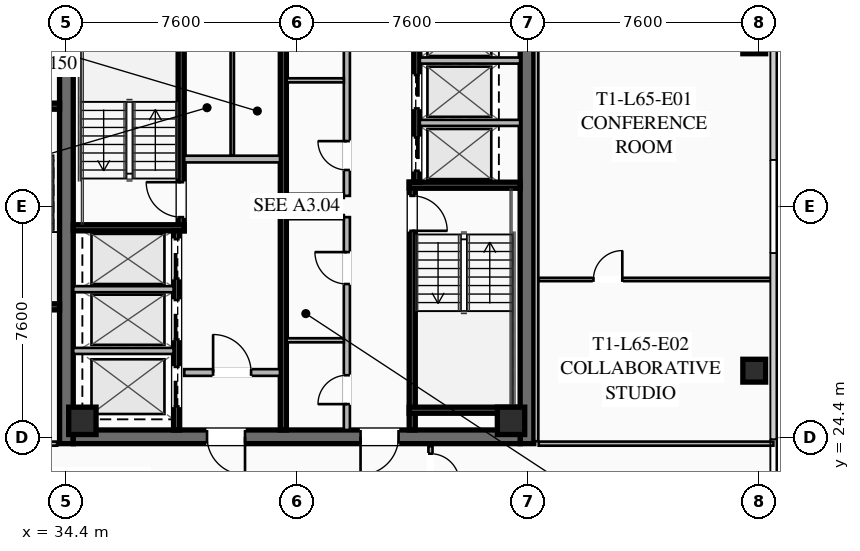
"""IFC4 building model, lengths in metres.
Left out: names, types, materials, properties, quantities, classifications, styles, units other than length and angle.
Written with IfcOpenShell. Run it as: python <this file> out.ifc"""

import sys

from ifc_helpers import new_model, si_unit, direction, frame, frame_2d, origin, origin_2d, place, context, subcontext, project, spatial, rectangle, hollow_rectangle, extrude, element, fill, save


model = new_model("IFC4")
c1 = context("Model", 3, precision=1e-05, world=origin(), true_north=direction((0.0, 1.0)))
c2 = subcontext(c1, "Body", "Model", "MODEL_VIEW")
j1 = project(units=[si_unit("LENGTHUNIT", "METRE"), si_unit("PLANEANGLEUNIT", "RADIAN")], contexts=[c1])
p1 = place(None, origin())
s1 = spatial("IfcSite", under=j1, at=p1, CompositionType="ELEMENT")
p2 = place(p1, origin())
s2 = spatial("IfcBuilding", under=s1, at=p2, CompositionType="ELEMENT")
p3 = place(p2, frame((0.0, 0.0, 239.7)))
s3 = spatial("IfcBuildingStorey", under=s2, at=p3, CompositionType="ELEMENT", Elevation=239.7)
for number, where, z_axis, x_axis in (
    (1, (34.425, 24.2, 0.0), (0.0, 0.0, 1.0), (0.0, 1.0, 0.0)),
    (2, (49.575, 39.8, 0.0), (0.0, 0.0, 1.0), (0.0, -1.0, 0.0)),
):
    element("IfcWall", number, at=place(p3, frame(where, z_axis=z_axis, x_axis=x_axis)), inside=s3, PredefinedType="SHEAR", context=c2, shape_type="SweptSolid", body=[
        extrude(rectangle(XDim=15.6, YDim=0.45, at=frame_2d((7.8, 0.0))), origin(), (0.0, 0.0, 1.0), 3.55),
    ])
p4 = place(p3, frame((49.35, 24.425, 0.0), z_axis=(0.0, 0.0, 1.0), x_axis=(-1.0, 0.0, 0.0)))
e3 = element("IfcWall", 3, at=p4, inside=s3, PredefinedType="SHEAR", context=c2, shape_type="SweptSolid", body=[
    extrude(rectangle(XDim=14.7, YDim=0.45, at=frame_2d((7.35, 0.0))), origin(), (0.0, 0.0, 1.0), 3.55),
])
p5 = place(p4, frame((9.05, 0.0, 0.0)))
e4 = element("IfcOpeningElement", 4, at=p5, cuts=e3, PredefinedType="OPENING", context=c2, shape_type="SweptSolid", body=[
    extrude(rectangle(XDim=1.25, YDim=2.25, at=frame_2d((0.625, 1.125))), frame((0.0, 0.235, 0.0), z_axis=(0.0, -1.0, 0.0), x_axis=(1.0, 0.0, 0.0)), (0.0, 0.0, 1.0), 0.47),
])
p6 = place(p4, frame((4.0, 0.0, 0.0)))
e5 = element("IfcOpeningElement", 5, at=p6, cuts=e3, PredefinedType="OPENING", context=c2, shape_type="SweptSolid", body=[
    extrude(rectangle(XDim=1.25, YDim=2.25, at=frame_2d((0.625, 1.125))), frame((0.0, 0.235, 0.0), z_axis=(0.0, -1.0, 0.0), x_axis=(1.0, 0.0, 0.0)), (0.0, 0.0, 1.0), 0.47),
])
for number, where, z_axis, x_axis in (
    (6, (34.95, 24.95, 0.0), (0.0, 0.0, 1.0), (1.0, 0.0, 0.0)),
    (7, (49.05, 24.95, 0.0), (0.0, 0.0, 1.0), (1.0, 0.0, 0.0)),
):
    element("IfcColumn", number, at=place(p3, frame(where, z_axis=z_axis, x_axis=x_axis)), inside=s3, PredefinedType="COLUMN", context=c2, shape_type="SweptSolid", body=[
        extrude(hollow_rectangle(XDim=0.9, YDim=0.9, WallThickness=0.04, at=origin_2d()), origin(), (0.0, 0.0, 1.0), 3.37),
    ])
for number, where, z_axis, x_axis in (
    (8, (57.05, 26.6, 0.0), (0.0, 0.0, 1.0), (1.0, 0.0, 0.0)),
    (9, (57.05, 37.4, 0.0), (0.0, 0.0, 1.0), (1.0, 0.0, 0.0)),
):
    element("IfcColumn", number, at=place(p3, frame(where, z_axis=z_axis, x_axis=x_axis)), inside=s3, PredefinedType="COLUMN", context=c2, shape_type="SweptSolid", body=[
        extrude(hollow_rectangle(XDim=0.75, YDim=0.75, WallThickness=0.032, at=origin_2d()), origin(), (0.0, 0.0, 1.0), 3.37),
    ])
p7 = place(p3, frame((38.2, 31.2, 0.0), z_axis=(0.0, 0.0, 1.0), x_axis=(0.0, 1.0, 0.0)))
e10 = element("IfcWall", 10, at=p7, inside=s3, PredefinedType="SHEAR", context=c2, shape_type="SweptSolid", body=[
    extrude(rectangle(XDim=8.15, YDim=0.2, at=frame_2d((4.075, 0.0))), origin(), (0.0, 0.0, 1.0), 3.37),
])
p8 = place(p7, frame((0.45, 0.0, 0.0)))
e11 = element("IfcOpeningElement", 11, at=p8, cuts=e10, PredefinedType="OPENING", context=c2, shape_type="SweptSolid", body=[
    extrude(rectangle(XDim=1.15, YDim=2.2, at=frame_2d((0.575, 1.1))), frame((0.0, 0.11, 0.0), z_axis=(0.0, -1.0, 0.0), x_axis=(1.0, 0.0, 0.0)), (0.0, 0.0, 1.0), 0.22),
])
p9 = place(p3, frame((34.65, 31.3, 0.0), z_axis=(0.0, 0.0, 1.0), x_axis=(1.0, 0.0, 0.0)))
e12 = element("IfcWall", 12, at=p9, inside=s3, PredefinedType="SHEAR", context=c2, shape_type="SweptSolid", body=[
    extrude(rectangle(XDim=3.65, YDim=0.2, at=frame_2d((1.825, 0.0))), origin(), (0.0, 0.0, 1.0), 3.37),
])
p10 = place(p3, frame((45.8, 32.8, 0.0), z_axis=(0.0, 0.0, 1.0), x_axis=(0.0, -1.0, 0.0)))
e13 = element("IfcWall", 13, at=p10, inside=s3, PredefinedType="SHEAR", context=c2, shape_type="SweptSolid", body=[
    extrude(rectangle(XDim=8.15, YDim=0.2, at=frame_2d((4.075, 0.0))), origin(), (0.0, 0.0, 1.0), 3.37),
])
p11 = place(p10, frame((0.45, 0.0, 0.0)))
e14 = element("IfcOpeningElement", 14, at=p11, cuts=e13, PredefinedType="OPENING", context=c2, shape_type="SweptSolid", body=[
    extrude(rectangle(XDim=1.15, YDim=2.2, at=frame_2d((0.575, 1.1))), frame((0.0, 0.11, 0.0), z_axis=(0.0, -1.0, 0.0), x_axis=(1.0, 0.0, 0.0)), (0.0, 0.0, 1.0), 0.22),
])
for number, where, z_axis, x_axis in (
    (15, (45.7, 32.7, 0.0), (0.0, 0.0, 1.0), (1.0, 0.0, 0.0)),
    (16, (45.7, 25.3, 0.0), (0.0, 0.0, 1.0), (1.0, 0.0, 0.0)),
):
    element("IfcWall", number, at=place(p3, frame(where, z_axis=z_axis, x_axis=x_axis)), inside=s3, PredefinedType="SHEAR", context=c2, shape_type="SweptSolid", body=[
        extrude(rectangle(XDim=3.65, YDim=0.2, at=frame_2d((1.825, 0.0))), origin(), (0.0, 0.0, 1.0), 3.37),
    ])
p12 = place(p3, frame((41.56, 24.65, 0.0), z_axis=(0.0, 0.0, 1.0), x_axis=(0.0, 1.0, 0.0)))
e17 = element("IfcWall", 17, at=p12, inside=s3, PredefinedType="SHEAR", context=c2, shape_type="SweptSolid", body=[
    extrude(rectangle(XDim=14.7, YDim=0.2, at=frame_2d((7.35, 0.0))), origin(), (0.0, 0.0, 1.0), 3.37),
])
p13 = place(p3, frame((38.3, 33.56, 0.0), z_axis=(0.0, 0.0, 1.0), x_axis=(1.0, 0.0, 0.0)))
e18 = element("IfcWall", 18, at=p13, inside=s3, PredefinedType="SOLIDWALL", context=c2, shape_type="SweptSolid", body=[
    extrude(rectangle(XDim=3.15, YDim=0.22, at=frame_2d((1.575, 0.0))), origin(), (0.0, 0.0, 1.0), 2.723),
])
p14 = place(p3, frame((38.3, 26.54, 0.0), z_axis=(0.0, 0.0, 1.0), x_axis=(1.0, 0.0, 0.0)))
e19 = element("IfcWall", 19, at=p14, inside=s3, PredefinedType="SOLIDWALL", context=c2, shape_type="SweptSolid", body=[
    extrude(rectangle(XDim=3.15, YDim=0.22, at=frame_2d((1.575, 0.0))), origin(), (0.0, 0.0, 1.0), 2.723),
])
p15 = place(p14, frame((0.95, 0.0, 0.0)))
e20 = element("IfcOpeningElement", 20, at=p15, cuts=e19, PredefinedType="OPENING", context=c2, shape_type="SweptSolid", body=[
    extrude(rectangle(XDim=1.25, YDim=2.25, at=frame_2d((0.625, 1.125))), frame((0.0, 0.12, 0.0), z_axis=(0.0, -1.0, 0.0), x_axis=(1.0, 0.0, 0.0)), (0.0, 0.0, 1.0), 0.24),
])
p16 = place(p3, frame((38.05, 24.65, 0.0), z_axis=(0.0, 0.0, 1.0), x_axis=(0.0, 1.0, 0.0)))
e21 = element("IfcWall", 21, at=p16, inside=s3, PredefinedType="SHEAR", context=c2, shape_type="SweptSolid", body=[
    extrude(rectangle(XDim=6.55, YDim=0.2, at=frame_2d((3.275, 0.0))), origin(), (0.0, 0.0, 1.0), 3.37),
])
p17 = place(p16, frame((4.975, 0.0, 0.0)))
e22 = element("IfcOpeningElement", 22, at=p17, cuts=e21, PredefinedType="OPENING", context=c2, shape_type="SweptSolid", body=[
    extrude(rectangle(XDim=1.3, YDim=2.25, at=frame_2d((0.65, 1.125))), frame((0.0, 0.11, 0.0), z_axis=(0.0, -1.0, 0.0), x_axis=(1.0, 0.0, 0.0)), (0.0, 0.0, 1.0), 0.22),
])
p18 = place(p16, frame((2.975, 0.0, 0.0)))
e23 = element("IfcOpeningElement", 23, at=p18, cuts=e21, PredefinedType="OPENING", context=c2, shape_type="SweptSolid", body=[
    extrude(rectangle(XDim=1.3, YDim=2.25, at=frame_2d((0.65, 1.125))), frame((0.0, 0.11, 0.0), z_axis=(0.0, -1.0, 0.0), x_axis=(1.0, 0.0, 0.0)), (0.0, 0.0, 1.0), 0.22),
])
p19 = place(p16, frame((0.775, 0.0, 0.0)))
e24 = element("IfcOpeningElement", 24, at=p19, cuts=e21, PredefinedType="OPENING", context=c2, shape_type="SweptSolid", body=[
    extrude(rectangle(XDim=1.3, YDim=2.25, at=frame_2d((0.65, 1.125))), frame((0.0, 0.11, 0.0), z_axis=(0.0, -1.0, 0.0), x_axis=(1.0, 0.0, 0.0)), (0.0, 0.0, 1.0), 0.22),
])
for number, where, z_axis, x_axis in (
    (25, (34.65, 27.25, 0.0), (0.0, 0.0, 1.0), (1.0, 0.0, 0.0)),
    (26, (34.65, 29.28, 0.0), (0.0, 0.0, 1.0), (1.0, 0.0, 0.0)),
):
    element("IfcWall", number, at=place(p3, frame(where, z_axis=z_axis, x_axis=x_axis)), inside=s3, PredefinedType="SOLIDWALL", context=c2, shape_type="SweptSolid", body=[
        extrude(rectangle(XDim=3.3, YDim=0.2, at=frame_2d((1.65, 0.0))), origin(), (0.0, 0.0, 1.0), 3.37),
    ])
p20 = place(p3, frame((45.95, 39.35, 0.0), z_axis=(0.0, 0.0, 1.0), x_axis=(0.0, -1.0, 0.0)))
e27 = element("IfcWall", 27, at=p20, inside=s3, PredefinedType="SHEAR", context=c2, shape_type="SweptSolid", body=[
    extrude(rectangle(XDim=6.55, YDim=0.2, at=frame_2d((3.275, 0.0))), origin(), (0.0, 0.0, 1.0), 3.37),
])
p21 = place(p20, frame((5.075, 0.0, 0.0)))
e28 = element("IfcOpeningElement", 28, at=p21, cuts=e27, PredefinedType="OPENING", context=c2, shape_type="SweptSolid", body=[
    extrude(rectangle(XDim=1.1, YDim=2.2, at=frame_2d((0.55, 1.1))), frame((0.0, 0.11, 0.0), z_axis=(0.0, -1.0, 0.0), x_axis=(1.0, 0.0, 0.0)), (0.0, 0.0, 1.0), 0.22),
])
p22 = place(p20, frame((3.025, 0.0, 0.0)))
e29 = element("IfcOpeningElement", 29, at=p22, cuts=e27, PredefinedType="OPENING", context=c2, shape_type="SweptSolid", body=[
    extrude(rectangle(XDim=1.1, YDim=2.2, at=frame_2d((0.55, 1.1))), frame((0.0, 0.11, 0.0), z_axis=(0.0, -1.0, 0.0), x_axis=(1.0, 0.0, 0.0)), (0.0, 0.0, 1.0), 0.22),
])
p23 = place(p20, frame((1.025, 0.0, 0.0)))
e30 = element("IfcOpeningElement", 30, at=p23, cuts=e27, PredefinedType="OPENING", context=c2, shape_type="SweptSolid", body=[
    extrude(rectangle(XDim=1.1, YDim=2.2, at=frame_2d((0.55, 1.1))), frame((0.0, 0.11, 0.0), z_axis=(0.0, -1.0, 0.0), x_axis=(1.0, 0.0, 0.0)), (0.0, 0.0, 1.0), 0.22),
])
for number, where, z_axis, x_axis in (
    (31, (46.05, 34.75, 0.0), (0.0, 0.0, 1.0), (1.0, 0.0, 0.0)),
    (32, (46.05, 36.8, 0.0), (0.0, 0.0, 1.0), (1.0, 0.0, 0.0)),
):
    element("IfcWall", number, at=place(p3, frame(where, z_axis=z_axis, x_axis=x_axis)), inside=s3, PredefinedType="SOLIDWALL", context=c2, shape_type="SweptSolid", body=[
        extrude(rectangle(XDim=3.3, YDim=0.2, at=frame_2d((1.65, 0.0))), origin(), (0.0, 0.0, 1.0), 3.37),
    ])
p24 = place(p3, frame((39.88, 33.68, 0.0), z_axis=(0.0, 0.0, 1.0), x_axis=(0.0, 1.0, 0.0)))
e33 = element("IfcWall", 33, at=p24, inside=s3, PredefinedType="PARTITIONING", context=c2, shape_type="SweptSolid", body=[
    extrude(rectangle(XDim=3.8, YDim=0.11, at=frame_2d((1.9, 0.0))), origin(), (0.0, 0.0, 1.0), 2.723),
])
p25 = place(p3, frame((43.65, 24.65, 0.0), z_axis=(0.0, 0.0, 1.0), x_axis=(0.0, 1.0, 0.0)))
e34 = element("IfcWall", 34, at=p25, inside=s3, PredefinedType="SOLIDWALL", context=c2, shape_type="SweptSolid", body=[
    extrude(rectangle(XDim=7.0, YDim=0.2, at=frame_2d((3.5, 0.0))), origin(), (0.0, 0.0, 1.0), 2.723),
])
p26 = place(p25, frame((0.85, 0.0, 0.0)))
e35 = element("IfcOpeningElement", 35, at=p26, cuts=e34, PredefinedType="OPENING", context=c2, shape_type="SweptSolid", body=[
    extrude(rectangle(XDim=0.95, YDim=2.05, at=frame_2d((0.475, 1.025))), frame((0.0, 0.11, 0.0), z_axis=(0.0, -1.0, 0.0), x_axis=(1.0, 0.0, 0.0)), (0.0, 0.0, 1.0), 0.22),
])
p27 = place(p25, frame((4.8, 0.0, 0.0)))
e36 = element("IfcOpeningElement", 36, at=p27, cuts=e34, PredefinedType="OPENING", context=c2, shape_type="SweptSolid", body=[
    extrude(rectangle(XDim=1.05, YDim=2.2, at=frame_2d((0.525, 1.1))), frame((0.0, 0.11, 0.0), z_axis=(0.0, -1.0, 0.0), x_axis=(1.0, 0.0, 0.0)), (0.0, 0.0, 1.0), 0.22),
])
for number, where, z_axis, x_axis in (
    (37, (41.67, 31.65, 0.0), (0.0, 0.0, 1.0), (1.0, 0.0, 0.0)),
    (38, (41.67, 27.6, 0.0), (0.0, 0.0, 1.0), (1.0, 0.0, 0.0)),
):
    element("IfcWall", number, at=place(p3, frame(where, z_axis=z_axis, x_axis=x_axis)), inside=s3, PredefinedType="PARTITIONING", context=c2, shape_type="SweptSolid", body=[
        extrude(rectangle(XDim=1.88, YDim=0.135, at=frame_2d((0.94, 0.0))), origin(), (0.0, 0.0, 1.0), 2.723),
    ])
p28 = place(p3, frame((43.65, 32.35, 0.0), z_axis=(0.0, 0.0, 1.0), x_axis=(0.0, 1.0, 0.0)))
e39 = element("IfcWall", 39, at=p28, inside=s3, PredefinedType="SOLIDWALL", context=c2, shape_type="SweptSolid", body=[
    extrude(rectangle(XDim=7.0, YDim=0.2, at=frame_2d((3.5, 0.0))), origin(), (0.0, 0.0, 1.0), 2.723),
])
p29 = place(p28, frame((0.85, 0.0, 0.0)))
e40 = element("IfcOpeningElement", 40, at=p29, cuts=e39, PredefinedType="OPENING", context=c2, shape_type="SweptSolid", body=[
    extrude(rectangle(XDim=0.95, YDim=2.05, at=frame_2d((0.475, 1.025))), frame((0.0, 0.11, 0.0), z_axis=(0.0, -1.0, 0.0), x_axis=(1.0, 0.0, 0.0)), (0.0, 0.0, 1.0), 0.22),
])
p30 = place(p28, frame((4.85, 0.0, 0.0)))
e41 = element("IfcOpeningElement", 41, at=p30, cuts=e39, PredefinedType="OPENING", context=c2, shape_type="SweptSolid", body=[
    extrude(rectangle(XDim=0.95, YDim=2.05, at=frame_2d((0.475, 1.025))), frame((0.0, 0.11, 0.0), z_axis=(0.0, -1.0, 0.0), x_axis=(1.0, 0.0, 0.0)), (0.0, 0.0, 1.0), 0.22),
])
for number, where, z_axis, x_axis in (
    (42, (41.67, 32.35, 0.0), (0.0, 0.0, 1.0), (1.0, 0.0, 0.0)),
    (43, (41.67, 36.15, 0.0), (0.0, 0.0, 1.0), (1.0, 0.0, 0.0)),
):
    element("IfcWall", number, at=place(p3, frame(where, z_axis=z_axis, x_axis=x_axis)), inside=s3, PredefinedType="PARTITIONING", context=c2, shape_type="SweptSolid", body=[
        extrude(rectangle(XDim=1.88, YDim=0.135, at=frame_2d((0.94, 0.0))), origin(), (0.0, 0.0, 1.0), 2.723),
    ])
p31 = place(p3, frame((34.2, 35.3, 0.0), z_axis=(0.0, 0.0, 1.0), x_axis=(-1.0, 0.0, 0.0)))
e44 = element("IfcWall", 44, at=p31, inside=s3, PredefinedType="SHEAR", context=c2, shape_type="SweptSolid", body=[
    extrude(rectangle(XDim=3.4, YDim=0.2, at=frame_2d((1.7, 0.0))), origin(), (0.0, 0.0, 1.0), 3.37),
])
p32 = place(p31, frame((0.275, 0.0, 0.0)))
e45 = element("IfcOpeningElement", 45, at=p32, cuts=e44, PredefinedType="OPENING", context=c2, shape_type="SweptSolid", body=[
    extrude(rectangle(XDim=1.15, YDim=2.2, at=frame_2d((0.575, 1.1))), frame((0.0, 0.11, 0.0), z_axis=(0.0, -1.0, 0.0), x_axis=(1.0, 0.0, 0.0)), (0.0, 0.0, 1.0), 0.22),
])
p33 = place(p3, frame((30.8, 28.7, 0.0), z_axis=(0.0, 0.0, 1.0), x_axis=(1.0, 0.0, 0.0)))
e46 = element("IfcWall", 46, at=p33, inside=s3, PredefinedType="SHEAR", context=c2, shape_type="SweptSolid", body=[
    extrude(rectangle(XDim=3.4, YDim=0.2, at=frame_2d((1.7, 0.0))), origin(), (0.0, 0.0, 1.0), 3.37),
])
p34 = place(p3, frame((46.4, 24.12, 0.0), z_axis=(0.0, 0.0, 1.0), x_axis=(0.0, -1.0, 0.0)))
e47 = element("IfcWall", 47, at=p34, inside=s3, PredefinedType="PARTITIONING", context=c2, shape_type="SweptSolid", body=[
    extrude(rectangle(XDim=2.24, YDim=0.135, at=frame_2d((1.12, 0.0))), origin(), (0.0, 0.0, 1.0), 2.723),
])
p35 = place(p34, frame((0.25, 0.0, 0.0)))
e48 = element("IfcOpeningElement", 48, at=p35, cuts=e47, PredefinedType="OPENING", context=c2, shape_type="SweptSolid", body=[
    extrude(rectangle(XDim=0.95, YDim=2.05, at=frame_2d((0.475, 1.025))), frame((0.0, 0.077, 0.0), z_axis=(0.0, -1.0, 0.0), x_axis=(1.0, 0.0, 0.0)), (0.0, 0.0, 1.0), 0.155),
])
p36 = place(p3, frame((49.88, 39.72, 0.0), z_axis=(0.0, 0.0, 1.0), x_axis=(0.0, -1.0, 0.0)))
e49 = element("IfcWall", 49, at=p36, inside=s3, PredefinedType="PARTITIONING", context=c2, shape_type="SweptSolid", body=[
    extrude(rectangle(XDim=15.44, YDim=0.135, at=frame_2d((7.72, 0.0))), origin(), (0.0, 0.0, 1.0), 2.723),
])
p37 = place(p3, frame((49.96, 24.2, 0.0), z_axis=(0.0, 0.0, 1.0), x_axis=(1.0, 0.0, 0.0)))
e50 = element("IfcWall", 50, at=p37, inside=s3, PredefinedType="PARTITIONING", context=c2, shape_type="SweptSolid", body=[
    extrude(rectangle(XDim=7.72, YDim=0.135, at=frame_2d((3.86, 0.0))), origin(), (0.0, 0.0, 1.0), 2.723),
])
p38 = place(p3, frame((49.96, 29.6, 0.0), z_axis=(0.0, 0.0, 1.0), x_axis=(1.0, 0.0, 0.0)))
e51 = element("IfcWall", 51, at=p38, inside=s3, PredefinedType="PARTITIONING", context=c2, shape_type="SweptSolid", body=[
    extrude(rectangle(XDim=7.72, YDim=0.11, at=frame_2d((3.86, 0.0))), origin(), (0.0, 0.0, 1.0), 2.723),
])
p39 = place(p38, frame((1.8, 0.0, 0.0)))
e52 = element("IfcOpeningElement", 52, at=p39, cuts=e51, PredefinedType="OPENING", context=c2, shape_type="SweptSolid", body=[
    extrude(rectangle(XDim=0.95, YDim=2.05, at=frame_2d((0.475, 1.025))), frame((0.0, 0.065, 0.0), z_axis=(0.0, -1.0, 0.0), x_axis=(1.0, 0.0, 0.0)), (0.0, 0.0, 1.0), 0.13),
])
p40 = place(p3, frame((26.32, 24.2, 0.0), z_axis=(0.0, 0.0, 1.0), x_axis=(1.0, 0.0, 0.0)))
e53 = element("IfcWall", 53, at=p40, inside=s3, PredefinedType="PARTITIONING", context=c2, shape_type="SweptSolid", body=[
    extrude(rectangle(XDim=7.8, YDim=0.135, at=frame_2d((3.9, 0.0))), origin(), (0.0, 0.0, 1.0), 2.723),
])
p41 = place(p40, frame((4.805, 0.0, 0.0)))
e54 = element("IfcOpeningElement", 54, at=p41, cuts=e53, PredefinedType="OPENING", context=c2, shape_type="SweptSolid", body=[
    extrude(rectangle(XDim=0.95, YDim=2.05, at=frame_2d((0.475, 1.025))), frame((0.0, 0.077, 0.0), z_axis=(0.0, -1.0, 0.0), x_axis=(1.0, 0.0, 0.0)), (0.0, 0.0, 1.0), 0.155),
])
p42 = place(p5, origin())
e55 = element("IfcDoor", 55, at=p42, inside=s3, OperationType="SINGLE_SWING_LEFT", PredefinedType="DOOR", context=c2, shape_type="SweptSolid", body=[
    extrude(rectangle(XDim=1.25, YDim=2.25, at=frame_2d((0.625, 1.125))), frame((0.0, 0.025, 0.0), z_axis=(0.0, -1.0, 0.0), x_axis=(1.0, 0.0, 0.0)), (0.0, 0.0, 1.0), 0.05),
])
fill(e4, e55)
p43 = place(p6, origin())
e56 = element("IfcDoor", 56, at=p43, inside=s3, OperationType="SINGLE_SWING_RIGHT", PredefinedType="DOOR", context=c2, shape_type="SweptSolid", body=[
    extrude(rectangle(XDim=1.25, YDim=2.25, at=frame_2d((0.625, 1.125))), frame((0.0, 0.025, 0.0), z_axis=(0.0, -1.0, 0.0), x_axis=(1.0, 0.0, 0.0)), (0.0, 0.0, 1.0), 0.05),
])
fill(e5, e56)
p44 = place(p8, origin())
e57 = element("IfcDoor", 57, at=p44, inside=s3, OperationType="SINGLE_SWING_RIGHT", PredefinedType="DOOR", context=c2, shape_type="SweptSolid", body=[
    extrude(rectangle(XDim=1.15, YDim=2.2, at=frame_2d((0.575, 1.1))), frame((0.0, 0.025, 0.0), z_axis=(0.0, -1.0, 0.0), x_axis=(1.0, 0.0, 0.0)), (0.0, 0.0, 1.0), 0.05),
])
fill(e11, e57)
p45 = place(p11, origin())
e58 = element("IfcDoor", 58, at=p45, inside=s3, OperationType="SINGLE_SWING_RIGHT", PredefinedType="DOOR", context=c2, shape_type="SweptSolid", body=[
    extrude(rectangle(XDim=1.15, YDim=2.2, at=frame_2d((0.575, 1.1))), frame((0.0, 0.025, 0.0), z_axis=(0.0, -1.0, 0.0), x_axis=(1.0, 0.0, 0.0)), (0.0, 0.0, 1.0), 0.05),
])
fill(e14, e58)
p46 = place(p15, origin())
e59 = element("IfcDoor", 59, at=p46, inside=s3, OperationType="SINGLE_SWING_LEFT", PredefinedType="DOOR", context=c2, shape_type="SweptSolid", body=[
    extrude(rectangle(XDim=1.25, YDim=2.25, at=frame_2d((0.625, 1.125))), frame((0.0, 0.025, 0.0), z_axis=(0.0, -1.0, 0.0), x_axis=(1.0, 0.0, 0.0)), (0.0, 0.0, 1.0), 0.05),
])
fill(e20, e59)
p47 = place(p26, origin())
e60 = element("IfcDoor", 60, at=p47, inside=s3, OperationType="SINGLE_SWING_LEFT", PredefinedType="DOOR", context=c2, shape_type="SweptSolid", body=[
    extrude(rectangle(XDim=0.95, YDim=2.05, at=frame_2d((0.475, 1.025))), frame((0.0, 0.025, 0.0), z_axis=(0.0, -1.0, 0.0), x_axis=(1.0, 0.0, 0.0)), (0.0, 0.0, 1.0), 0.05),
])
fill(e35, e60)
p48 = place(p27, origin())
e61 = element("IfcDoor", 61, at=p48, inside=s3, OperationType="SINGLE_SWING_RIGHT", PredefinedType="DOOR", context=c2, shape_type="SweptSolid", body=[
    extrude(rectangle(XDim=1.05, YDim=2.2, at=frame_2d((0.525, 1.1))), frame((0.0, 0.025, 0.0), z_axis=(0.0, -1.0, 0.0), x_axis=(1.0, 0.0, 0.0)), (0.0, 0.0, 1.0), 0.05),
])
fill(e36, e61)
p49 = place(p29, origin())
e62 = element("IfcDoor", 62, at=p49, inside=s3, OperationType="SINGLE_SWING_RIGHT", PredefinedType="DOOR", context=c2, shape_type="SweptSolid", body=[
    extrude(rectangle(XDim=0.95, YDim=2.05, at=frame_2d((0.475, 1.025))), frame((0.0, 0.025, 0.0), z_axis=(0.0, -1.0, 0.0), x_axis=(1.0, 0.0, 0.0)), (0.0, 0.0, 1.0), 0.05),
])
fill(e40, e62)
p50 = place(p35, origin())
e63 = element("IfcDoor", 63, at=p50, inside=s3, OperationType="SINGLE_SWING_RIGHT", PredefinedType="DOOR", context=c2, shape_type="SweptSolid", body=[
    extrude(rectangle(XDim=0.95, YDim=2.05, at=frame_2d((0.475, 1.025))), frame((0.0, 0.025, 0.0), z_axis=(0.0, -1.0, 0.0), x_axis=(1.0, 0.0, 0.0)), (0.0, 0.0, 1.0), 0.05),
])
fill(e48, e63)
p51 = place(p39, origin())
e64 = element("IfcDoor", 64, at=p51, inside=s3, OperationType="SINGLE_SWING_RIGHT", PredefinedType="DOOR", context=c2, shape_type="SweptSolid", body=[
    extrude(rectangle(XDim=0.95, YDim=2.05, at=frame_2d((0.475, 1.025))), frame((0.0, 0.025, 0.0), z_axis=(0.0, -1.0, 0.0), x_axis=(1.0, 0.0, 0.0)), (0.0, 0.0, 1.0), 0.05),
])
fill(e52, e64)
p52 = place(p17, origin())
e65 = element("IfcDoor", 65, at=p52, inside=s3, OperationType="SLIDING_TO_LEFT", PredefinedType="DOOR", context=c2, shape_type="SweptSolid", body=[
    extrude(rectangle(XDim=1.3, YDim=2.25, at=frame_2d((0.65, 1.125))), frame((0.0, 0.025, 0.0), z_axis=(0.0, -1.0, 0.0), x_axis=(1.0, 0.0, 0.0)), (0.0, 0.0, 1.0), 0.05),
])
fill(e22, e65)
p53 = place(p18, origin())
e66 = element("IfcDoor", 66, at=p53, inside=s3, OperationType="SLIDING_TO_LEFT", PredefinedType="DOOR", context=c2, shape_type="SweptSolid", body=[
    extrude(rectangle(XDim=1.3, YDim=2.25, at=frame_2d((0.65, 1.125))), frame((0.0, 0.025, 0.0), z_axis=(0.0, -1.0, 0.0), x_axis=(1.0, 0.0, 0.0)), (0.0, 0.0, 1.0), 0.05),
])
fill(e23, e66)
p54 = place(p19, origin())
e67 = element("IfcDoor", 67, at=p54, inside=s3, OperationType="SLIDING_TO_LEFT", PredefinedType="DOOR", context=c2, shape_type="SweptSolid", body=[
    extrude(rectangle(XDim=1.3, YDim=2.25, at=frame_2d((0.65, 1.125))), frame((0.0, 0.025, 0.0), z_axis=(0.0, -1.0, 0.0), x_axis=(1.0, 0.0, 0.0)), (0.0, 0.0, 1.0), 0.05),
])
fill(e24, e67)
p55 = place(p21, origin())
e68 = element("IfcDoor", 68, at=p55, inside=s3, OperationType="SLIDING_TO_LEFT", PredefinedType="DOOR", context=c2, shape_type="SweptSolid", body=[
    extrude(rectangle(XDim=1.1, YDim=2.2, at=frame_2d((0.55, 1.1))), frame((0.0, 0.025, 0.0), z_axis=(0.0, -1.0, 0.0), x_axis=(1.0, 0.0, 0.0)), (0.0, 0.0, 1.0), 0.05),
])
fill(e28, e68)
p56 = place(p22, origin())
e69 = element("IfcDoor", 69, at=p56, inside=s3, OperationType="SLIDING_TO_LEFT", PredefinedType="DOOR", context=c2, shape_type="SweptSolid", body=[
    extrude(rectangle(XDim=1.1, YDim=2.2, at=frame_2d((0.55, 1.1))), frame((0.0, 0.025, 0.0), z_axis=(0.0, -1.0, 0.0), x_axis=(1.0, 0.0, 0.0)), (0.0, 0.0, 1.0), 0.05),
])
fill(e29, e69)
save(model, sys.argv[1])
